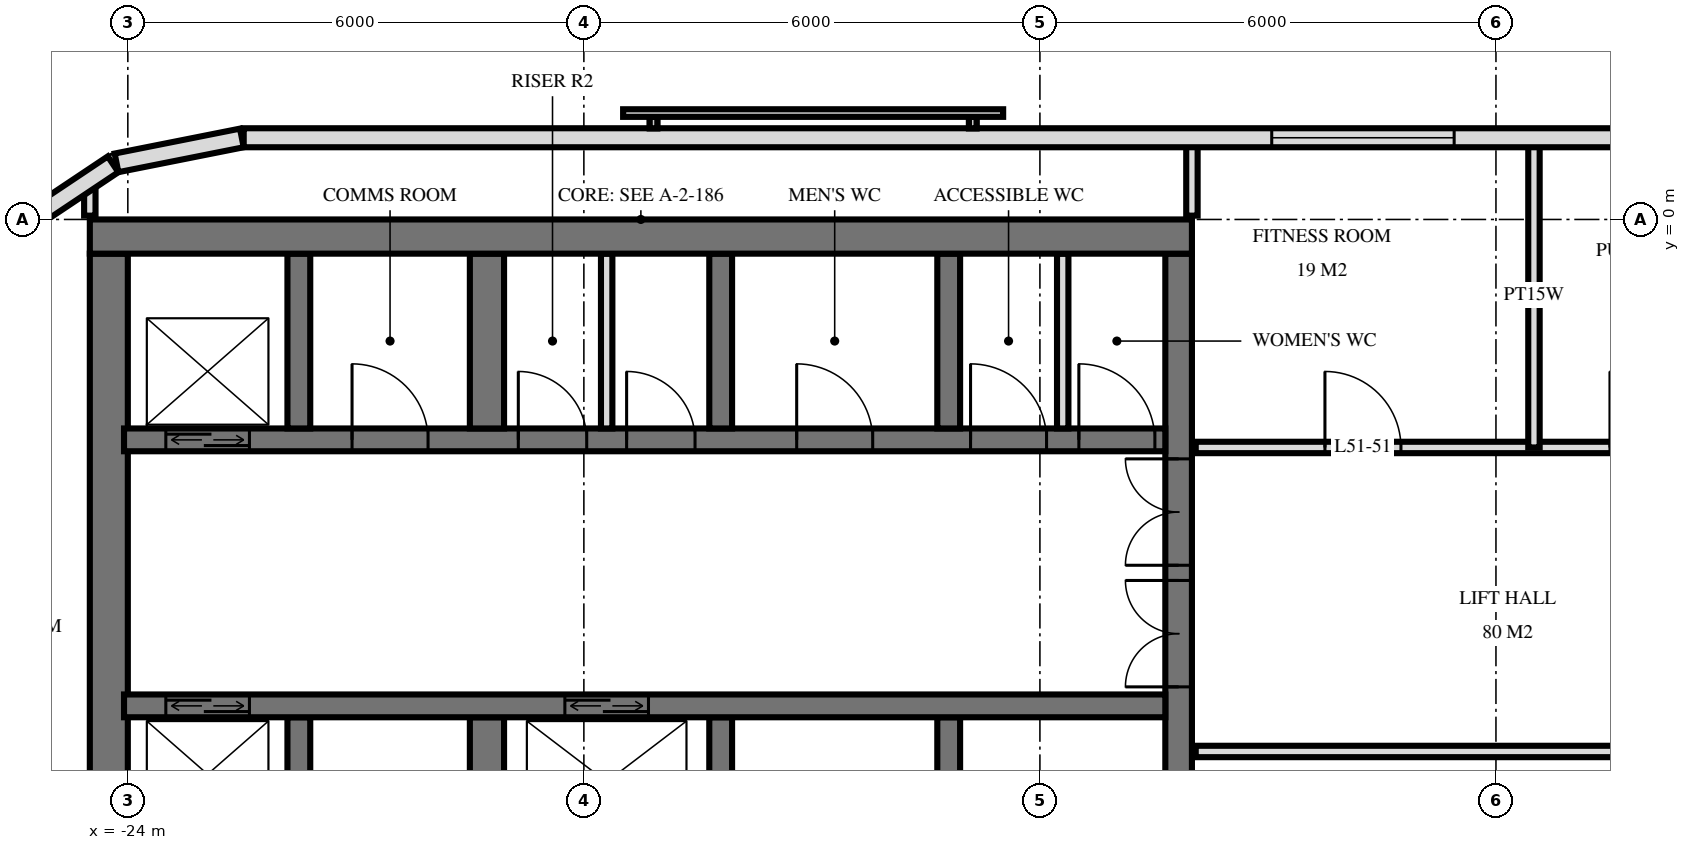
"""IFC4 building model, lengths in metres.
Left out: names, types, materials, properties, quantities, classifications, styles, units other than length and angle.
Written with IfcOpenShell. Run it as: python <this file> out.ifc"""

import sys

from ifc_helpers import new_model, si_unit, direction, frame, frame_2d, origin, place, context, subcontext, project, spatial, rectangle, extrude, element, fill, save


model = new_model("IFC4")
c1 = context("Model", 3, precision=1e-05, world=origin(), true_north=direction((0.0, 1.0)))
c2 = subcontext(c1, "Body", "Model", "MODEL_VIEW")
j1 = project(units=[si_unit("LENGTHUNIT", "METRE"), si_unit("PLANEANGLEUNIT", "RADIAN")], contexts=[c1])
p1 = place(None, origin())
s1 = spatial("IfcSite", under=j1, at=p1, CompositionType="ELEMENT")
p2 = place(p1, origin())
s2 = spatial("IfcBuilding", under=s1, at=p2, CompositionType="ELEMENT")
p3 = place(p2, frame((0.0, 0.0, 197.6)))
s3 = spatial("IfcBuildingStorey", under=s2, at=p3, CompositionType="ELEMENT", Elevation=197.6)
p4 = place(p3, frame((-24.5, -0.225, 0.0), z_axis=(0.0, 0.0, 1.0), x_axis=(1.0, 0.0, 0.0)))
e1 = element("IfcWall", 1, at=p4, inside=s3, PredefinedType="SHEAR", context=c2, shape_type="SweptSolid", body=[
    extrude(rectangle(XDim=14.5, YDim=0.45, at=frame_2d((7.25, 0.0))), origin(), (0.0, 0.0, 1.0), 3.5),
])
p5 = place(p3, frame((-10.175, -14.55, 0.0), z_axis=(0.0, 0.0, 1.0), x_axis=(0.0, 1.0, 0.0)))
e2 = element("IfcWall", 2, at=p5, inside=s3, PredefinedType="SHEAR", context=c2, shape_type="SweptSolid", body=[
    extrude(rectangle(XDim=14.1, YDim=0.35, at=frame_2d((7.05, 0.0))), origin(), (0.0, 0.0, 1.0), 3.5),
])
p6 = place(p5, frame((8.4, 0.0, 0.0)))
e3 = element("IfcOpeningElement", 3, at=p6, cuts=e2, PredefinedType="OPENING", context=c2, shape_type="SweptSolid", body=[
    extrude(rectangle(XDim=1.4, YDim=2.4, at=frame_2d((0.7, 1.2))), frame((0.0, 0.185, 0.0), z_axis=(0.0, -1.0, 0.0), x_axis=(1.0, 0.0, 0.0)), (0.0, 0.0, 1.0), 0.37),
])
p7 = place(p5, frame((10.0, 0.0, 0.0)))
e4 = element("IfcOpeningElement", 4, at=p7, cuts=e2, PredefinedType="OPENING", context=c2, shape_type="SweptSolid", body=[
    extrude(rectangle(XDim=1.4, YDim=2.4, at=frame_2d((0.7, 1.2))), frame((0.0, 0.185, 0.0), z_axis=(0.0, -1.0, 0.0), x_axis=(1.0, 0.0, 0.0)), (0.0, 0.0, 1.0), 0.37),
])
p8 = place(p5, frame((4.0, 0.0, 0.0)))
e5 = element("IfcOpeningElement", 5, at=p8, cuts=e2, PredefinedType="OPENING", context=c2, shape_type="SweptSolid", body=[
    extrude(rectangle(XDim=1.2, YDim=2.1, at=frame_2d((0.6, 1.05))), frame((0.0, 0.185, 0.0), z_axis=(0.0, -1.0, 0.0), x_axis=(1.0, 0.0, 0.0)), (0.0, 0.0, 1.0), 0.37),
])
p9 = place(p3, frame((-24.25, -14.55, 0.0), z_axis=(0.0, 0.0, 1.0), x_axis=(0.0, 1.0, 0.0)))
e6 = element("IfcWall", 6, at=p9, inside=s3, PredefinedType="SHEAR", context=c2, shape_type="SweptSolid", body=[
    extrude(rectangle(XDim=14.1, YDim=0.5, at=frame_2d((7.05, 0.0))), origin(), (0.0, 0.0, 1.0), 3.5),
])
p10 = place(p3, frame((-24.05, -2.9, 0.0), z_axis=(0.0, 0.0, 1.0), x_axis=(1.0, 0.0, 0.0)))
e7 = element("IfcWall", 7, at=p10, inside=s3, PredefinedType="SHEAR", context=c2, shape_type="SweptSolid", body=[
    extrude(rectangle(XDim=13.7, YDim=0.3, at=frame_2d((6.85, 0.0))), origin(), (0.0, 0.0, 1.0), 3.5),
])
p11 = place(p10, frame((0.55, 0.0, 0.0)))
e8 = element("IfcOpeningElement", 8, at=p11, cuts=e7, PredefinedType="OPENING", context=c2, shape_type="SweptSolid", body=[
    extrude(rectangle(XDim=1.1, YDim=2.1, at=frame_2d((0.55, 1.05))), frame((0.0, 0.16, 0.0), z_axis=(0.0, -1.0, 0.0), x_axis=(1.0, 0.0, 0.0)), (0.0, 0.0, 1.0), 0.32),
])
p12 = place(p10, frame((6.613, 0.0, 0.0)))
e9 = element("IfcOpeningElement", 9, at=p12, cuts=e7, PredefinedType="OPENING", context=c2, shape_type="SweptSolid", body=[
    extrude(rectangle(XDim=0.9, YDim=2.1, at=frame_2d((0.45, 1.05))), frame((0.0, 0.16, 0.0), z_axis=(0.0, -1.0, 0.0), x_axis=(1.0, 0.0, 0.0)), (0.0, 0.0, 1.0), 0.32),
])
p13 = place(p10, frame((5.188, 0.0, 0.0)))
e10 = element("IfcOpeningElement", 10, at=p13, cuts=e7, PredefinedType="OPENING", context=c2, shape_type="SweptSolid", body=[
    extrude(rectangle(XDim=0.9, YDim=2.1, at=frame_2d((0.45, 1.05))), frame((0.0, 0.16, 0.0), z_axis=(0.0, -1.0, 0.0), x_axis=(1.0, 0.0, 0.0)), (0.0, 0.0, 1.0), 0.32),
])
p14 = place(p10, frame((12.562, 0.0, 0.0)))
e11 = element("IfcOpeningElement", 11, at=p14, cuts=e7, PredefinedType="OPENING", context=c2, shape_type="SweptSolid", body=[
    extrude(rectangle(XDim=1.0, YDim=2.1, at=frame_2d((0.5, 1.05))), frame((0.0, 0.16, 0.0), z_axis=(0.0, -1.0, 0.0), x_axis=(1.0, 0.0, 0.0)), (0.0, 0.0, 1.0), 0.32),
])
p15 = place(p10, frame((11.137, 0.0, 0.0)))
e12 = element("IfcOpeningElement", 12, at=p15, cuts=e7, PredefinedType="OPENING", context=c2, shape_type="SweptSolid", body=[
    extrude(rectangle(XDim=1.0, YDim=2.1, at=frame_2d((0.5, 1.05))), frame((0.0, 0.16, 0.0), z_axis=(0.0, -1.0, 0.0), x_axis=(1.0, 0.0, 0.0)), (0.0, 0.0, 1.0), 0.32),
])
p16 = place(p10, frame((8.85, 0.0, 0.0)))
e13 = element("IfcOpeningElement", 13, at=p16, cuts=e7, PredefinedType="OPENING", context=c2, shape_type="SweptSolid", body=[
    extrude(rectangle(XDim=1.0, YDim=2.1, at=frame_2d((0.5, 1.05))), frame((0.0, 0.16, 0.0), z_axis=(0.0, -1.0, 0.0), x_axis=(1.0, 0.0, 0.0)), (0.0, 0.0, 1.0), 0.32),
])
p17 = place(p10, frame((3.0, 0.0, 0.0)))
e14 = element("IfcOpeningElement", 14, at=p17, cuts=e7, PredefinedType="OPENING", context=c2, shape_type="SweptSolid", body=[
    extrude(rectangle(XDim=1.0, YDim=2.1, at=frame_2d((0.5, 1.05))), frame((0.0, 0.16, 0.0), z_axis=(0.0, -1.0, 0.0), x_axis=(1.0, 0.0, 0.0)), (0.0, 0.0, 1.0), 0.32),
])
p18 = place(p3, frame((-24.05, -6.4, 0.0), z_axis=(0.0, 0.0, 1.0), x_axis=(1.0, 0.0, 0.0)))
e15 = element("IfcWall", 15, at=p18, inside=s3, PredefinedType="SHEAR", context=c2, shape_type="SweptSolid", body=[
    extrude(rectangle(XDim=13.7, YDim=0.3, at=frame_2d((6.85, 0.0))), origin(), (0.0, 0.0, 1.0), 3.5),
])
p19 = place(p18, frame((0.55, 0.0, 0.0)))
e16 = element("IfcOpeningElement", 16, at=p19, cuts=e15, PredefinedType="OPENING", context=c2, shape_type="SweptSolid", body=[
    extrude(rectangle(XDim=1.1, YDim=2.1, at=frame_2d((0.55, 1.05))), frame((0.0, 0.16, 0.0), z_axis=(0.0, -1.0, 0.0), x_axis=(1.0, 0.0, 0.0)), (0.0, 0.0, 1.0), 0.32),
])
p20 = place(p18, frame((5.8, 0.0, 0.0)))
e17 = element("IfcOpeningElement", 17, at=p20, cuts=e15, PredefinedType="OPENING", context=c2, shape_type="SweptSolid", body=[
    extrude(rectangle(XDim=1.1, YDim=2.1, at=frame_2d((0.55, 1.05))), frame((0.0, 0.16, 0.0), z_axis=(0.0, -1.0, 0.0), x_axis=(1.0, 0.0, 0.0)), (0.0, 0.0, 1.0), 0.32),
])
for number, where, z_axis, x_axis in (
    (18, (-13.2, -2.75, 0.0), (0.0, 0.0, 1.0), (0.0, 1.0, 0.0)),
    (19, (-13.2, -8.85, 0.0), (0.0, 0.0, 1.0), (0.0, 1.0, 0.0)),
    (20, (-16.2, -2.75, 0.0), (0.0, 0.0, 1.0), (0.0, 1.0, 0.0)),
    (21, (-16.2, -8.85, 0.0), (0.0, 0.0, 1.0), (0.0, 1.0, 0.0)),
):
    element("IfcWall", number, at=place(p3, frame(where, z_axis=z_axis, x_axis=x_axis)), inside=s3, PredefinedType="SHEAR", context=c2, shape_type="SweptSolid", body=[
        extrude(rectangle(XDim=2.3, YDim=0.3, at=frame_2d((1.15, 0.0))), origin(), (0.0, 0.0, 1.0), 3.5),
    ])
for number, where, z_axis, x_axis in (
    (22, (-19.275, -2.75, 0.0), (0.0, 0.0, 1.0), (0.0, 1.0, 0.0)),
    (23, (-19.275, -8.85, 0.0), (0.0, 0.0, 1.0), (0.0, 1.0, 0.0)),
):
    element("IfcWall", number, at=place(p3, frame(where, z_axis=z_axis, x_axis=x_axis)), inside=s3, PredefinedType="SHEAR", context=c2, shape_type="SweptSolid", body=[
        extrude(rectangle(XDim=2.3, YDim=0.45, at=frame_2d((1.15, 0.0))), origin(), (0.0, 0.0, 1.0), 3.5),
    ])
for number, where, z_axis, x_axis in (
    (24, (-21.75, -2.75, 0.0), (0.0, 0.0, 1.0), (0.0, 1.0, 0.0)),
    (25, (-21.75, -8.85, 0.0), (0.0, 0.0, 1.0), (0.0, 1.0, 0.0)),
):
    element("IfcWall", number, at=place(p3, frame(where, z_axis=z_axis, x_axis=x_axis)), inside=s3, PredefinedType="SHEAR", context=c2, shape_type="SweptSolid", body=[
        extrude(rectangle(XDim=2.3, YDim=0.3, at=frame_2d((1.15, 0.0))), origin(), (0.0, 0.0, 1.0), 3.5),
    ])
p21 = place(p3, frame((22.475, 1.075, 0.0), z_axis=(0.0, 0.0, 1.0), x_axis=(-1.0, 0.0, 0.0)))
e26 = element("IfcWall", 26, at=p21, inside=s3, PredefinedType="SOLIDWALL", context=c2, shape_type="SweptSolid", body=[
    extrude(rectangle(XDim=44.951, YDim=0.25, at=frame_2d((22.475, 0.0))), origin(), (0.0, 0.0, 1.0), 3.22),
])
p22 = place(p21, frame((13.775, 0.0, 0.9)))
e27 = element("IfcOpeningElement", 27, at=p22, cuts=e26, PredefinedType="OPENING", context=c2, shape_type="SweptSolid", body=[
    extrude(rectangle(XDim=2.4, YDim=1.5, at=frame_2d((1.2, 0.75))), frame((0.0, 0.135, 0.0), z_axis=(0.0, -1.0, 0.0), x_axis=(1.0, 0.0, 0.0)), (0.0, 0.0, 1.0), 0.27),
])
p23 = place(p21, frame((18.275, 0.0, 0.9)))
e28 = element("IfcOpeningElement", 28, at=p23, cuts=e26, PredefinedType="OPENING", context=c2, shape_type="SweptSolid", body=[
    extrude(rectangle(XDim=2.4, YDim=1.5, at=frame_2d((1.2, 0.75))), frame((0.0, 0.135, 0.0), z_axis=(0.0, -1.0, 0.0), x_axis=(1.0, 0.0, 0.0)), (0.0, 0.0, 1.0), 0.27),
])
p24 = place(p21, frame((29.025, 0.0, 0.9)))
e29 = element("IfcOpeningElement", 29, at=p24, cuts=e26, PredefinedType="OPENING", context=c2, shape_type="SweptSolid", body=[
    extrude(rectangle(XDim=2.4, YDim=1.5, at=frame_2d((1.2, 0.75))), frame((0.0, 0.135, 0.0), z_axis=(0.0, -1.0, 0.0), x_axis=(1.0, 0.0, 0.0)), (0.0, 0.0, 1.0), 0.27),
])
p25 = place(p3, frame((-22.5, 1.073, 0.0), z_axis=(0.0, 0.0, 1.0), x_axis=(-0.980803419081, -0.194999110559, 0.0)))
e30 = element("IfcWall", 30, at=p25, inside=s3, PredefinedType="SOLIDWALL", context=c2, shape_type="SweptSolid", body=[
    extrude(rectangle(XDim=1.681, YDim=0.25, at=frame_2d((0.841, 0.0))), origin(), (0.0, 0.0, 1.0), 3.22),
])
p26 = place(p3, frame((-24.194, 0.726, 0.0), z_axis=(0.0, 0.0, 1.0), x_axis=(-0.831482937015, -0.55555029066, 0.0)))
e31 = element("IfcWall", 31, at=p26, inside=s3, PredefinedType="SOLIDWALL", context=c2, shape_type="SweptSolid", body=[
    extrude(rectangle(XDim=1.656, YDim=0.25, at=frame_2d((0.828, 0.0))), origin(), (0.0, 0.0, 1.0), 3.22),
])
for number, where, z_axis, x_axis in (
    (32, (-17.7, -2.75, 0.0), (0.0, 0.0, 1.0), (0.0, 1.0, 0.0)),
    (33, (-11.7, -2.75, 0.0), (0.0, 0.0, 1.0), (0.0, 1.0, 0.0)),
):
    element("IfcWall", number, at=place(p3, frame(where, z_axis=z_axis, x_axis=x_axis)), inside=s3, PredefinedType="PARTITIONING", context=c2, shape_type="SweptSolid", body=[
        extrude(rectangle(XDim=2.3, YDim=0.15, at=frame_2d((1.15, 0.0))), origin(), (0.0, 0.0, 1.0), 3.2),
    ])
p27 = place(p3, frame((-5.5, -3.0, 0.0), z_axis=(0.0, 0.0, 1.0), x_axis=(0.0, 1.0, 0.0)))
e34 = element("IfcWall", 34, at=p27, inside=s3, PredefinedType="PLUMBINGWALL", context=c2, shape_type="SweptSolid", body=[
    extrude(rectangle(XDim=4.02, YDim=0.15, at=frame_2d((2.01, 0.0))), origin(), (0.0, 0.0, 1.0), 3.22),
])
p28 = place(p3, frame((-10.0, 0.05, 0.0), z_axis=(0.0, 0.0, 1.0), x_axis=(0.0, 1.0, 0.0)))
e35 = element("IfcWall", 35, at=p28, inside=s3, PredefinedType="PARTITIONING", context=c2, shape_type="SweptSolid", body=[
    extrude(rectangle(XDim=0.97, YDim=0.15, at=frame_2d((0.485, 0.0))), origin(), (0.0, 0.0, 1.0), 3.22),
])
p29 = place(p3, frame((-24.5, 0.05, 0.0), z_axis=(0.0, 0.0, 1.0), x_axis=(0.0, 1.0, 0.0)))
e36 = element("IfcWall", 36, at=p29, inside=s3, PredefinedType="PARTITIONING", context=c2, shape_type="SweptSolid", body=[
    extrude(rectangle(XDim=0.405, YDim=0.15, at=frame_2d((0.203, 0.0))), origin(), (0.0, 0.0, 1.0), 3.22),
])
p30 = place(p3, frame((-9.95, -7.0, 0.0), z_axis=(0.0, 0.0, 1.0), x_axis=(1.0, 0.0, 0.0)))
e37 = element("IfcWall", 37, at=p30, inside=s3, PredefinedType="PARTITIONING", context=c2, shape_type="SweptSolid", body=[
    extrude(rectangle(XDim=19.9, YDim=0.15, at=frame_2d((9.95, 0.0))), origin(), (0.0, 0.0, 1.0), 3.22),
])
p31 = place(p30, frame((9.45, 0.0, 0.0)))
e38 = element("IfcOpeningElement", 38, at=p31, cuts=e37, PredefinedType="OPENING", context=c2, shape_type="SweptSolid", body=[
    extrude(rectangle(XDim=1.0, YDim=2.1, at=frame_2d((0.5, 1.05))), frame((0.0, 0.085, 0.0), z_axis=(0.0, -1.0, 0.0), x_axis=(1.0, 0.0, 0.0)), (0.0, 0.0, 1.0), 0.17),
])
p32 = place(p30, frame((15.45, 0.0, 0.0)))
e39 = element("IfcOpeningElement", 39, at=p32, cuts=e37, PredefinedType="OPENING", context=c2, shape_type="SweptSolid", body=[
    extrude(rectangle(XDim=1.0, YDim=2.1, at=frame_2d((0.5, 1.05))), frame((0.0, 0.085, 0.0), z_axis=(0.0, -1.0, 0.0), x_axis=(1.0, 0.0, 0.0)), (0.0, 0.0, 1.0), 0.17),
])
p33 = place(p3, frame((-9.95, -3.0, 0.0), z_axis=(0.0, 0.0, 1.0), x_axis=(1.0, 0.0, 0.0)))
e40 = element("IfcWall", 40, at=p33, inside=s3, PredefinedType="PARTITIONING", context=c2, shape_type="SweptSolid", body=[
    extrude(rectangle(XDim=19.9, YDim=0.15, at=frame_2d((9.95, 0.0))), origin(), (0.0, 0.0, 1.0), 3.22),
])
p34 = place(p33, frame((1.7, 0.0, 0.0)))
e41 = element("IfcOpeningElement", 41, at=p34, cuts=e40, PredefinedType="OPENING", context=c2, shape_type="SweptSolid", body=[
    extrude(rectangle(XDim=1.0, YDim=2.1, at=frame_2d((0.5, 1.05))), frame((0.0, 0.085, 0.0), z_axis=(0.0, -1.0, 0.0), x_axis=(1.0, 0.0, 0.0)), (0.0, 0.0, 1.0), 0.17),
])
p35 = place(p33, frame((5.45, 0.0, 0.0)))
e42 = element("IfcOpeningElement", 42, at=p35, cuts=e40, PredefinedType="OPENING", context=c2, shape_type="SweptSolid", body=[
    extrude(rectangle(XDim=1.0, YDim=2.1, at=frame_2d((0.5, 1.05))), frame((0.0, 0.085, 0.0), z_axis=(0.0, -1.0, 0.0), x_axis=(1.0, 0.0, 0.0)), (0.0, 0.0, 1.0), 0.17),
])
p36 = place(p33, frame((8.2, 0.0, 0.0)))
e43 = element("IfcOpeningElement", 43, at=p36, cuts=e40, PredefinedType="OPENING", context=c2, shape_type="SweptSolid", body=[
    extrude(rectangle(XDim=1.0, YDim=2.1, at=frame_2d((0.5, 1.05))), frame((0.0, 0.085, 0.0), z_axis=(0.0, -1.0, 0.0), x_axis=(1.0, 0.0, 0.0)), (0.0, 0.0, 1.0), 0.17),
])
p37 = place(p33, frame((11.95, 0.0, 0.0)))
e44 = element("IfcOpeningElement", 44, at=p37, cuts=e40, PredefinedType="OPENING", context=c2, shape_type="SweptSolid", body=[
    extrude(rectangle(XDim=1.0, YDim=2.1, at=frame_2d((0.5, 1.05))), frame((0.0, 0.085, 0.0), z_axis=(0.0, -1.0, 0.0), x_axis=(1.0, 0.0, 0.0)), (0.0, 0.0, 1.0), 0.17),
])
p38 = place(p33, frame((16.95, 0.0, 0.0)))
e45 = element("IfcOpeningElement", 45, at=p38, cuts=e40, PredefinedType="OPENING", context=c2, shape_type="SweptSolid", body=[
    extrude(rectangle(XDim=1.0, YDim=2.1, at=frame_2d((0.5, 1.05))), frame((0.0, 0.085, 0.0), z_axis=(0.0, -1.0, 0.0), x_axis=(1.0, 0.0, 0.0)), (0.0, 0.0, 1.0), 0.17),
])
p39 = place(p24, origin())
e46 = element("IfcWindow", 46, at=p39, inside=s3, PartitioningType="SINGLE_PANEL", PredefinedType="WINDOW", context=c2, shape_type="SweptSolid", body=[
    extrude(rectangle(XDim=2.4, YDim=1.5, at=frame_2d((1.2, 0.75))), frame((0.0, 0.03, 0.0), z_axis=(0.0, -1.0, 0.0), x_axis=(1.0, 0.0, 0.0)), (0.0, 0.0, 1.0), 0.06),
])
fill(e29, e46)
p40 = place(p11, origin())
e47 = element("IfcDoor", 47, at=p40, inside=s3, OperationType="DOUBLE_DOOR_SLIDING", PredefinedType="USERDEFINED", context=c2, shape_type="SweptSolid", body=[
    extrude(rectangle(XDim=1.1, YDim=2.1, at=frame_2d((0.55, 1.05))), frame((0.0, 0.025, 0.0), z_axis=(0.0, -1.0, 0.0), x_axis=(1.0, 0.0, 0.0)), (0.0, 0.0, 1.0), 0.05),
])
fill(e8, e47)
p41 = place(p19, origin())
e48 = element("IfcDoor", 48, at=p41, inside=s3, OperationType="DOUBLE_DOOR_SLIDING", PredefinedType="USERDEFINED", context=c2, shape_type="SweptSolid", body=[
    extrude(rectangle(XDim=1.1, YDim=2.1, at=frame_2d((0.55, 1.05))), frame((0.0, 0.025, 0.0), z_axis=(0.0, -1.0, 0.0), x_axis=(1.0, 0.0, 0.0)), (0.0, 0.0, 1.0), 0.05),
])
fill(e16, e48)
p42 = place(p20, origin())
e49 = element("IfcDoor", 49, at=p42, inside=s3, OperationType="DOUBLE_DOOR_SLIDING", PredefinedType="USERDEFINED", context=c2, shape_type="SweptSolid", body=[
    extrude(rectangle(XDim=1.1, YDim=2.1, at=frame_2d((0.55, 1.05))), frame((0.0, 0.025, 0.0), z_axis=(0.0, -1.0, 0.0), x_axis=(1.0, 0.0, 0.0)), (0.0, 0.0, 1.0), 0.05),
])
fill(e17, e49)
p43 = place(p6, origin())
e50 = element("IfcDoor", 50, at=p43, inside=s3, OperationType="DOUBLE_DOOR_SINGLE_SWING", PredefinedType="DOOR", context=c2, shape_type="SweptSolid", body=[
    extrude(rectangle(XDim=1.4, YDim=2.4, at=frame_2d((0.7, 1.2))), frame((0.0, 0.025, 0.0), z_axis=(0.0, -1.0, 0.0), x_axis=(1.0, 0.0, 0.0)), (0.0, 0.0, 1.0), 0.05),
])
fill(e3, e50)
p44 = place(p7, origin())
e51 = element("IfcDoor", 51, at=p44, inside=s3, OperationType="DOUBLE_DOOR_SINGLE_SWING", PredefinedType="DOOR", context=c2, shape_type="SweptSolid", body=[
    extrude(rectangle(XDim=1.4, YDim=2.4, at=frame_2d((0.7, 1.2))), frame((0.0, 0.025, 0.0), z_axis=(0.0, -1.0, 0.0), x_axis=(1.0, 0.0, 0.0)), (0.0, 0.0, 1.0), 0.05),
])
fill(e4, e51)
p45 = place(p12, origin())
e52 = element("IfcDoor", 52, at=p45, inside=s3, OperationType="SINGLE_SWING_RIGHT", PredefinedType="DOOR", context=c2, shape_type="SweptSolid", body=[
    extrude(rectangle(XDim=0.9, YDim=2.1, at=frame_2d((0.45, 1.05))), frame((0.0, 0.025, 0.0), z_axis=(0.0, -1.0, 0.0), x_axis=(1.0, 0.0, 0.0)), (0.0, 0.0, 1.0), 0.05),
])
fill(e9, e52)
p46 = place(p13, origin())
e53 = element("IfcDoor", 53, at=p46, inside=s3, OperationType="SINGLE_SWING_RIGHT", PredefinedType="DOOR", context=c2, shape_type="SweptSolid", body=[
    extrude(rectangle(XDim=0.9, YDim=2.1, at=frame_2d((0.45, 1.05))), frame((0.0, 0.025, 0.0), z_axis=(0.0, -1.0, 0.0), x_axis=(1.0, 0.0, 0.0)), (0.0, 0.0, 1.0), 0.05),
])
fill(e10, e53)
p47 = place(p14, origin())
e54 = element("IfcDoor", 54, at=p47, inside=s3, OperationType="SINGLE_SWING_RIGHT", PredefinedType="DOOR", context=c2, shape_type="SweptSolid", body=[
    extrude(rectangle(XDim=1.0, YDim=2.1, at=frame_2d((0.5, 1.05))), frame((0.0, 0.025, 0.0), z_axis=(0.0, -1.0, 0.0), x_axis=(1.0, 0.0, 0.0)), (0.0, 0.0, 1.0), 0.05),
])
fill(e11, e54)
p48 = place(p15, origin())
e55 = element("IfcDoor", 55, at=p48, inside=s3, OperationType="SINGLE_SWING_RIGHT", PredefinedType="DOOR", context=c2, shape_type="SweptSolid", body=[
    extrude(rectangle(XDim=1.0, YDim=2.1, at=frame_2d((0.5, 1.05))), frame((0.0, 0.025, 0.0), z_axis=(0.0, -1.0, 0.0), x_axis=(1.0, 0.0, 0.0)), (0.0, 0.0, 1.0), 0.05),
])
fill(e12, e55)
p49 = place(p16, origin())
e56 = element("IfcDoor", 56, at=p49, inside=s3, OperationType="SINGLE_SWING_RIGHT", PredefinedType="DOOR", context=c2, shape_type="SweptSolid", body=[
    extrude(rectangle(XDim=1.0, YDim=2.1, at=frame_2d((0.5, 1.05))), frame((0.0, 0.025, 0.0), z_axis=(0.0, -1.0, 0.0), x_axis=(1.0, 0.0, 0.0)), (0.0, 0.0, 1.0), 0.05),
])
fill(e13, e56)
p50 = place(p17, origin())
e57 = element("IfcDoor", 57, at=p50, inside=s3, OperationType="SINGLE_SWING_RIGHT", PredefinedType="DOOR", context=c2, shape_type="SweptSolid", body=[
    extrude(rectangle(XDim=1.0, YDim=2.1, at=frame_2d((0.5, 1.05))), frame((0.0, 0.025, 0.0), z_axis=(0.0, -1.0, 0.0), x_axis=(1.0, 0.0, 0.0)), (0.0, 0.0, 1.0), 0.05),
])
fill(e14, e57)
p51 = place(p34, origin())
e58 = element("IfcDoor", 58, at=p51, inside=s3, OperationType="SINGLE_SWING_RIGHT", PredefinedType="DOOR", context=c2, shape_type="SweptSolid", body=[
    extrude(rectangle(XDim=1.0, YDim=2.1, at=frame_2d((0.5, 1.05))), frame((0.0, 0.025, 0.0), z_axis=(0.0, -1.0, 0.0), x_axis=(1.0, 0.0, 0.0)), (0.0, 0.0, 1.0), 0.05),
])
fill(e41, e58)
save(model, sys.argv[1])
